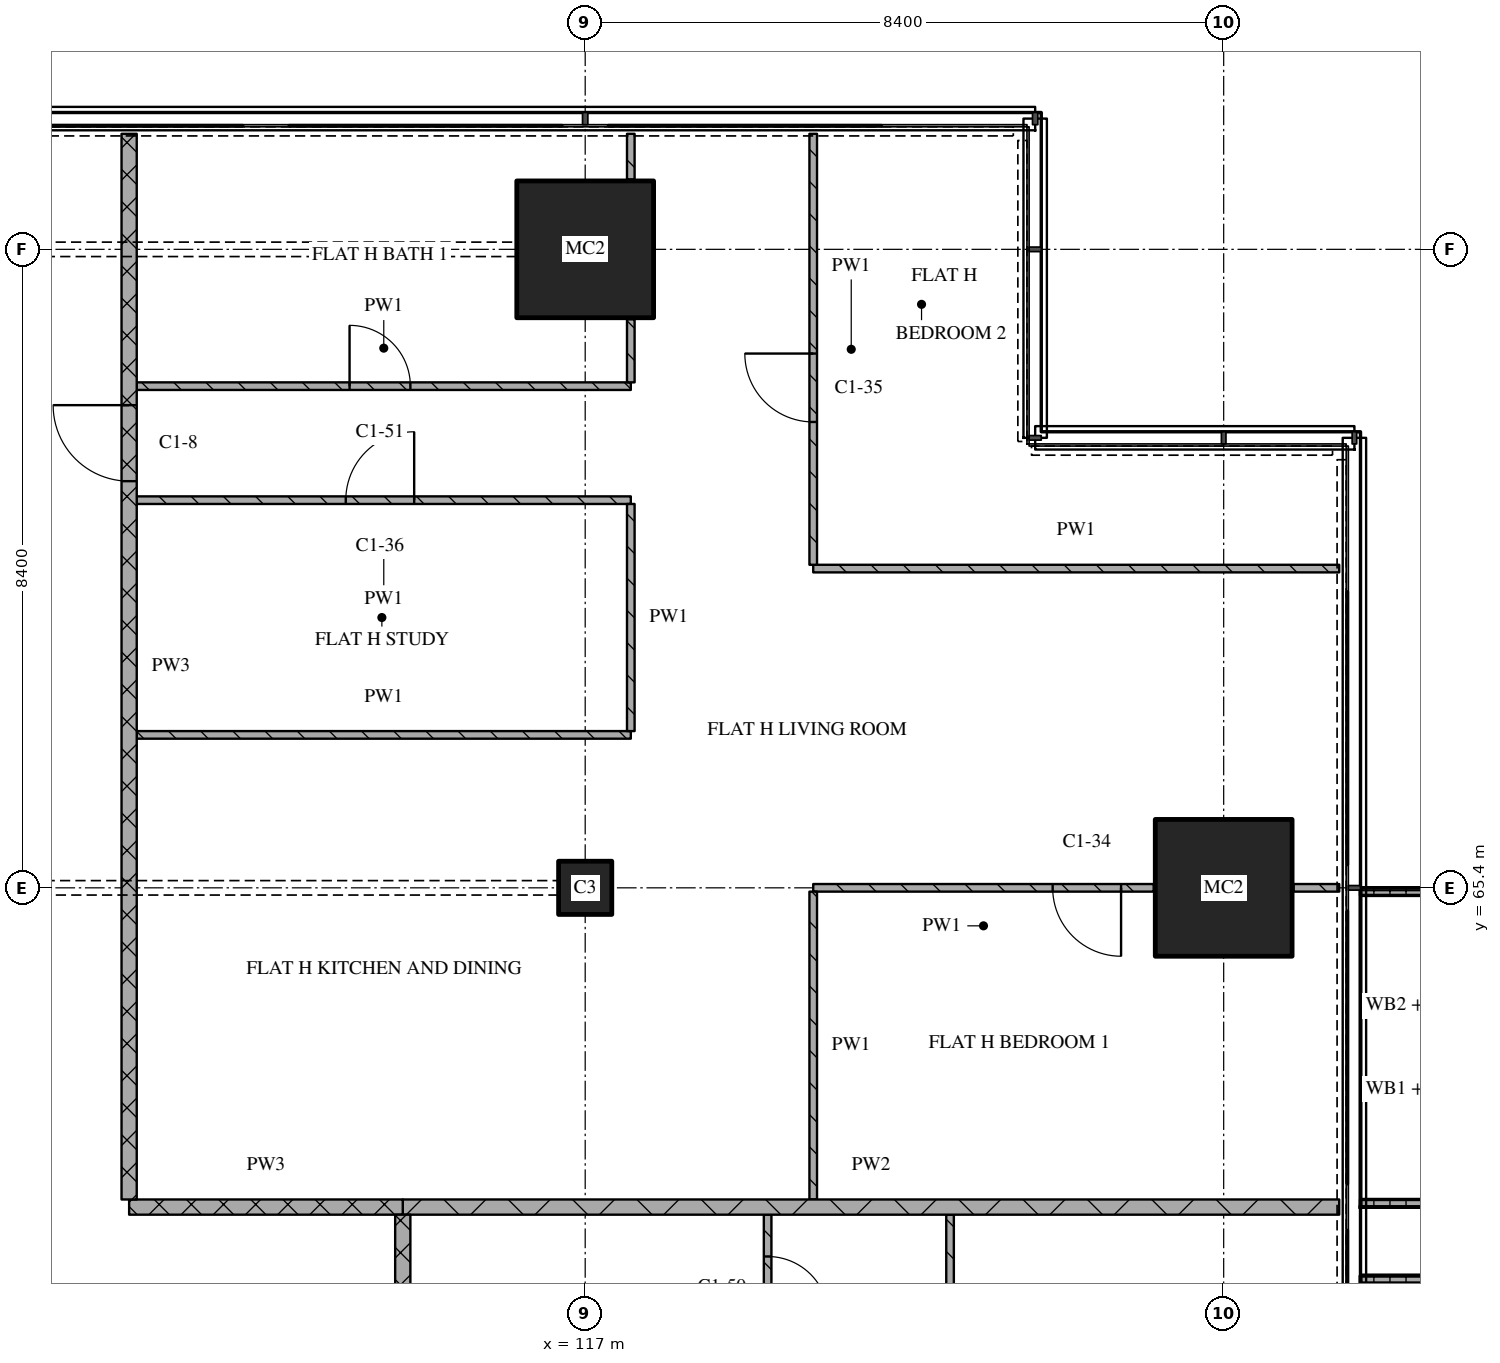
"""IFC4 building model, lengths in metres.
Left out: names, types, materials, properties, quantities, classifications, styles, units other than length and angle.
Written with IfcOpenShell. Run it as: python <this file> out.ifc"""

import sys

from ifc_helpers import new_model, si_unit, direction, frame, frame_2d, origin, origin_2d, place, context, subcontext, project, spatial, polyline, rectangle, outline, extrude, element, fill, save


model = new_model("IFC4")
c1 = context("Model", 3, precision=1e-05, world=origin(), true_north=direction((0.0, 1.0)))
c2 = subcontext(c1, "Body", "Model", "MODEL_VIEW")
j1 = project(units=[si_unit("LENGTHUNIT", "METRE"), si_unit("PLANEANGLEUNIT", "RADIAN")], contexts=[c1])
p1 = place(None, origin())
s1 = spatial("IfcSite", under=j1, at=p1, CompositionType="ELEMENT")
p2 = place(p1, origin())
s2 = spatial("IfcBuilding", under=s1, at=p2, CompositionType="ELEMENT")
p3 = place(p2, frame((0.0, 0.0, 147.45)))
s3 = spatial("IfcBuildingStorey", under=s2, at=p3, CompositionType="ELEMENT", Elevation=147.45)
p4 = place(p3, frame((117.0, 65.4, 0.0), z_axis=(0.0, 0.0, 1.0), x_axis=(1.0, 0.0, 0.0)))
e1 = element("IfcColumn", 1, at=p4, inside=s3, PredefinedType="COLUMN", context=c2, shape_type="SweptSolid", body=[
    extrude(rectangle(XDim=0.7, YDim=0.7, at=origin_2d()), origin(), (0.0, 0.0, 1.0), 3.6),
])
for number, where, z_axis, x_axis in (
    (2, (117.0, 73.8, 0.0), (0.0, 0.0, 1.0), (1.0, 0.0, 0.0)),
    (3, (125.4, 65.4, 0.0), (0.0, 0.0, 1.0), (1.0, 0.0, 0.0)),
):
    element("IfcColumn", number, at=place(p3, frame(where, z_axis=z_axis, x_axis=x_axis)), inside=s3, PredefinedType="COLUMN", context=c2, shape_type="SweptSolid", body=[
        extrude(rectangle(XDim=1.8, YDim=1.8, at=origin_2d()), origin(), (0.0, 0.0, 1.0), 3.6),
    ])
p5 = place(p3, origin())
e4 = element("IfcWall", 4, at=p5, inside=s3, PredefinedType="SOLIDWALL", context=c2, shape_type="SweptSolid", body=[
    extrude(outline(polyline([(127.2, 57.9), (127.2, 58.0), (128.7, 58.0), (128.7, 60.2), (127.2, 60.2), (127.2, 60.3), (128.8, 60.3), (128.8, 57.9), (127.2, 57.9)])), origin(), (0.0, 0.0, 1.0), 1.0),
])
p6 = place(p3, origin())
e5 = element("IfcWall", 5, at=p6, inside=s3, PredefinedType="SOLIDWALL", context=c2, shape_type="SweptSolid", body=[
    extrude(outline(polyline([(127.2, 61.2), (127.2, 61.3), (128.833, 61.3), (128.833, 65.3), (127.2, 65.3), (127.2, 65.4), (128.933, 65.4), (128.933, 61.2), (127.2, 61.2)])), origin(), (0.0, 0.0, 1.0), 1.0),
])
p7 = place(p3, frame((111.0, 61.2, 0.0), z_axis=(0.0, 0.0, 1.0), x_axis=(1.0, 0.0, 0.0)))
e6 = element("IfcWall", 6, at=p7, inside=s3, PredefinedType="PARTITIONING", context=c2, shape_type="SweptSolid", body=[
    extrude(rectangle(XDim=3.6, YDim=0.2, at=frame_2d((1.8, 0.0))), origin(), (0.0, 0.0, 1.0), 3.32),
])
p8 = place(p3, frame((114.6, 61.2, 0.0), z_axis=(0.0, 0.0, 1.0), x_axis=(1.0, 0.0, 0.0)))
e7 = element("IfcWall", 7, at=p8, inside=s3, PredefinedType="PARTITIONING", context=c2, shape_type="SweptSolid", body=[
    extrude(rectangle(XDim=12.32, YDim=0.2, at=frame_2d((6.16, 0.0))), origin(), (0.0, 0.0, 1.0), 3.32),
])
p9 = place(p3, frame((124.48, 65.4, 0.0), z_axis=(0.0, 0.0, 1.0), x_axis=(-1.0, 0.0, 0.0)))
e8 = element("IfcWall", 8, at=p9, inside=s3, PredefinedType="PARTITIONING", context=c2, shape_type="SweptSolid", body=[
    extrude(rectangle(XDim=4.48, YDim=0.1, at=frame_2d((2.24, 0.0))), origin(), (0.0, 0.0, 1.0), 3.32),
])
p10 = place(p9, frame((0.43, 0.0, 0.0)))
e9 = element("IfcOpeningElement", 9, at=p10, cuts=e8, PredefinedType="OPENING", context=c2, shape_type="SweptSolid", body=[
    extrude(rectangle(XDim=0.9, YDim=2.1, at=frame_2d((0.45, 1.05))), frame((0.0, 0.06, 0.0), z_axis=(0.0, -1.0, 0.0), x_axis=(1.0, 0.0, 0.0)), (0.0, 0.0, 1.0), 0.12),
])
p11 = place(p3, frame((126.32, 65.4, 0.0), z_axis=(0.0, 0.0, 1.0), x_axis=(1.0, 0.0, 0.0)))
e10 = element("IfcWall", 10, at=p11, inside=s3, PredefinedType="PARTITIONING", context=c2, shape_type="SweptSolid", body=[
    extrude(rectangle(XDim=0.6, YDim=0.1, at=frame_2d((0.3, 0.0))), origin(), (0.0, 0.0, 1.0), 3.32),
])
p12 = place(p3, frame((111.1, 67.412, 0.0), z_axis=(0.0, 0.0, 1.0), x_axis=(1.0, 0.0, 0.0)))
e11 = element("IfcWall", 11, at=p12, inside=s3, PredefinedType="PARTITIONING", context=c2, shape_type="SweptSolid", body=[
    extrude(rectangle(XDim=6.5, YDim=0.1, at=frame_2d((3.25, 0.0))), origin(), (0.0, 0.0, 1.0), 3.32),
])
p13 = place(p3, frame((120.0, 69.6, 0.0), z_axis=(0.0, 0.0, 1.0), x_axis=(1.0, 0.0, 0.0)))
e12 = element("IfcWall", 12, at=p13, inside=s3, PredefinedType="PARTITIONING", context=c2, shape_type="SweptSolid", body=[
    extrude(rectangle(XDim=6.92, YDim=0.1, at=frame_2d((3.46, 0.0))), origin(), (0.0, 0.0, 1.0), 3.32),
])
p14 = place(p3, frame((117.6, 70.5, 0.0), z_axis=(0.0, 0.0, 1.0), x_axis=(-1.0, 0.0, 0.0)))
e13 = element("IfcWall", 13, at=p14, inside=s3, PredefinedType="PARTITIONING", context=c2, shape_type="SweptSolid", body=[
    extrude(rectangle(XDim=6.5, YDim=0.1, at=frame_2d((3.25, 0.0))), origin(), (0.0, 0.0, 1.0), 3.32),
])
p15 = place(p14, frame((2.85, 0.0, 0.0)))
e14 = element("IfcOpeningElement", 14, at=p15, cuts=e13, PredefinedType="OPENING", context=c2, shape_type="SweptSolid", body=[
    extrude(rectangle(XDim=0.9, YDim=2.1, at=frame_2d((0.45, 1.05))), frame((0.0, 0.06, 0.0), z_axis=(0.0, -1.0, 0.0), x_axis=(1.0, 0.0, 0.0)), (0.0, 0.0, 1.0), 0.12),
])
p16 = place(p3, frame((111.1, 72.0, 0.0), z_axis=(0.0, 0.0, 1.0), x_axis=(1.0, 0.0, 0.0)))
e15 = element("IfcWall", 15, at=p16, inside=s3, PredefinedType="PARTITIONING", context=c2, shape_type="SweptSolid", body=[
    extrude(rectangle(XDim=6.5, YDim=0.1, at=frame_2d((3.25, 0.0))), origin(), (0.0, 0.0, 1.0), 3.32),
])
p17 = place(p16, frame((2.8, 0.0, 0.0)))
e16 = element("IfcOpeningElement", 16, at=p17, cuts=e15, PredefinedType="OPENING", context=c2, shape_type="SweptSolid", body=[
    extrude(rectangle(XDim=0.8, YDim=2.1, at=frame_2d((0.4, 1.05))), frame((0.0, 0.06, 0.0), z_axis=(0.0, -1.0, 0.0), x_axis=(1.0, 0.0, 0.0)), (0.0, 0.0, 1.0), 0.12),
])
p18 = place(p3, frame((111.0, 75.32, 0.0), z_axis=(0.0, 0.0, 1.0), x_axis=(0.0, -1.0, 0.0)))
e17 = element("IfcWall", 17, at=p18, inside=s3, PredefinedType="PARTITIONING", context=c2, shape_type="SweptSolid", body=[
    extrude(rectangle(XDim=14.02, YDim=0.2, at=frame_2d((7.01, 0.0))), origin(), (0.0, 0.0, 1.0), 3.32),
])
p19 = place(p18, frame((3.57, 0.0, 0.0)))
e18 = element("IfcOpeningElement", 18, at=p19, cuts=e17, PredefinedType="OPENING", context=c2, shape_type="SweptSolid", body=[
    extrude(rectangle(XDim=1.0, YDim=2.1, at=frame_2d((0.5, 1.05))), frame((0.0, 0.11, 0.0), z_axis=(0.0, -1.0, 0.0), x_axis=(1.0, 0.0, 0.0)), (0.0, 0.0, 1.0), 0.22),
])
p20 = place(p3, frame((114.6, 61.1, 0.0), z_axis=(0.0, 0.0, 1.0), x_axis=(0.0, -1.0, 0.0)))
e19 = element("IfcWall", 19, at=p20, inside=s3, PredefinedType="PARTITIONING", context=c2, shape_type="SweptSolid", body=[
    extrude(rectangle(XDim=17.8, YDim=0.2, at=frame_2d((8.9, 0.0))), origin(), (0.0, 0.0, 1.0), 3.32),
])
p21 = place(p20, frame((4.65, 0.0, 0.0)))
e20 = element("IfcOpeningElement", 20, at=p21, cuts=e19, PredefinedType="OPENING", context=c2, shape_type="SweptSolid", body=[
    extrude(rectangle(XDim=1.0, YDim=2.1, at=frame_2d((0.5, 1.05))), frame((0.0, 0.11, 0.0), z_axis=(0.0, -1.0, 0.0), x_axis=(1.0, 0.0, 0.0)), (0.0, 0.0, 1.0), 0.22),
])
p22 = place(p3, frame((117.6, 70.45, 0.0), z_axis=(0.0, 0.0, 1.0), x_axis=(0.0, -1.0, 0.0)))
e21 = element("IfcWall", 21, at=p22, inside=s3, PredefinedType="PARTITIONING", context=c2, shape_type="SweptSolid", body=[
    extrude(rectangle(XDim=2.988, YDim=0.1, at=frame_2d((1.494, 0.0))), origin(), (0.0, 0.0, 1.0), 3.32),
])
p23 = place(p3, frame((117.6, 72.88, 0.0), z_axis=(0.0, 0.0, 1.0), x_axis=(0.0, -1.0, 0.0)))
e22 = element("IfcWall", 22, at=p23, inside=s3, PredefinedType="PARTITIONING", context=c2, shape_type="SweptSolid", body=[
    extrude(rectangle(XDim=0.83, YDim=0.1, at=frame_2d((0.415, 0.0))), origin(), (0.0, 0.0, 1.0), 3.32),
])
p24 = place(p3, frame((117.6, 75.32, 0.0), z_axis=(0.0, 0.0, 1.0), x_axis=(0.0, -1.0, 0.0)))
e23 = element("IfcWall", 23, at=p24, inside=s3, PredefinedType="PARTITIONING", context=c2, shape_type="SweptSolid", body=[
    extrude(rectangle(XDim=0.6, YDim=0.1, at=frame_2d((0.3, 0.0))), origin(), (0.0, 0.0, 1.0), 3.32),
])
p25 = place(p3, frame((119.4, 56.75, 0.0), z_axis=(0.0, 0.0, 1.0), x_axis=(0.0, 1.0, 0.0)))
e24 = element("IfcWall", 24, at=p25, inside=s3, PredefinedType="PARTITIONING", context=c2, shape_type="SweptSolid", body=[
    extrude(rectangle(XDim=4.35, YDim=0.1, at=frame_2d((2.175, 0.0))), origin(), (0.0, 0.0, 1.0), 3.32),
])
p26 = place(p25, frame((3.0, 0.0, 0.0)))
e25 = element("IfcOpeningElement", 25, at=p26, cuts=e24, PredefinedType="OPENING", context=c2, shape_type="SweptSolid", body=[
    extrude(rectangle(XDim=0.8, YDim=2.1, at=frame_2d((0.4, 1.05))), frame((0.0, 0.06, 0.0), z_axis=(0.0, -1.0, 0.0), x_axis=(1.0, 0.0, 0.0)), (0.0, 0.0, 1.0), 0.12),
])
p27 = place(p3, frame((120.0, 65.35, 0.0), z_axis=(0.0, 0.0, 1.0), x_axis=(0.0, -1.0, 0.0)))
e26 = element("IfcWall", 26, at=p27, inside=s3, PredefinedType="PARTITIONING", context=c2, shape_type="SweptSolid", body=[
    extrude(rectangle(XDim=4.05, YDim=0.1, at=frame_2d((2.025, 0.0))), origin(), (0.0, 0.0, 1.0), 3.32),
])
p28 = place(p3, frame((120.0, 75.32, 0.0), z_axis=(0.0, 0.0, 1.0), x_axis=(0.0, -1.0, 0.0)))
e27 = element("IfcWall", 27, at=p28, inside=s3, PredefinedType="PARTITIONING", context=c2, shape_type="SweptSolid", body=[
    extrude(rectangle(XDim=5.67, YDim=0.1, at=frame_2d((2.835, 0.0))), origin(), (0.0, 0.0, 1.0), 3.32),
])
p29 = place(p28, frame((2.891, 0.0, 0.0)))
e28 = element("IfcOpeningElement", 28, at=p29, cuts=e27, PredefinedType="OPENING", context=c2, shape_type="SweptSolid", body=[
    extrude(rectangle(XDim=0.9, YDim=2.1, at=frame_2d((0.45, 1.05))), frame((0.0, 0.06, 0.0), z_axis=(0.0, -1.0, 0.0), x_axis=(1.0, 0.0, 0.0)), (0.0, 0.0, 1.0), 0.12),
])
p30 = place(p3, frame((121.8, 61.1, 0.0), z_axis=(0.0, 0.0, 1.0), x_axis=(0.0, -1.0, 0.0)))
e29 = element("IfcWall", 29, at=p30, inside=s3, PredefinedType="PARTITIONING", context=c2, shape_type="SweptSolid", body=[
    extrude(rectangle(XDim=8.25, YDim=0.1, at=frame_2d((4.125, 0.0))), origin(), (0.0, 0.0, 1.0), 3.32),
])
p31 = place(p30, frame((3.65, 0.0, 0.0)))
e30 = element("IfcOpeningElement", 30, at=p31, cuts=e29, PredefinedType="OPENING", context=c2, shape_type="SweptSolid", body=[
    extrude(rectangle(XDim=0.9, YDim=2.1, at=frame_2d((0.45, 1.05))), frame((0.0, 0.06, 0.0), z_axis=(0.0, -1.0, 0.0), x_axis=(1.0, 0.0, 0.0)), (0.0, 0.0, 1.0), 0.12),
])
p32 = place(p10, origin())
e31 = element("IfcDoor", 31, at=p32, inside=s3, OperationType="SINGLE_SWING_LEFT", PredefinedType="DOOR", context=c2, shape_type="SweptSolid", body=[
    extrude(rectangle(XDim=0.9, YDim=2.1, at=frame_2d((0.45, 1.05))), frame((0.0, 0.025, 0.0), z_axis=(0.0, -1.0, 0.0), x_axis=(1.0, 0.0, 0.0)), (0.0, 0.0, 1.0), 0.05),
])
fill(e9, e31)
p33 = place(p15, origin())
e32 = element("IfcDoor", 32, at=p33, inside=s3, OperationType="SINGLE_SWING_RIGHT", PredefinedType="DOOR", context=c2, shape_type="SweptSolid", body=[
    extrude(rectangle(XDim=0.9, YDim=2.1, at=frame_2d((0.45, 1.05))), frame((0.0, 0.025, 0.0), z_axis=(0.0, -1.0, 0.0), x_axis=(1.0, 0.0, 0.0)), (0.0, 0.0, 1.0), 0.05),
])
fill(e14, e32)
p34 = place(p17, origin())
e33 = element("IfcDoor", 33, at=p34, inside=s3, OperationType="SINGLE_SWING_LEFT", PredefinedType="DOOR", context=c2, shape_type="SweptSolid", body=[
    extrude(rectangle(XDim=0.8, YDim=2.1, at=frame_2d((0.4, 1.05))), frame((0.0, 0.025, 0.0), z_axis=(0.0, -1.0, 0.0), x_axis=(1.0, 0.0, 0.0)), (0.0, 0.0, 1.0), 0.05),
])
fill(e16, e33)
p35 = place(p19, origin())
e34 = element("IfcDoor", 34, at=p35, inside=s3, OperationType="SINGLE_SWING_RIGHT", PredefinedType="DOOR", context=c2, shape_type="SweptSolid", body=[
    extrude(rectangle(XDim=1.0, YDim=2.1, at=frame_2d((0.5, 1.05))), frame((0.0, 0.025, 0.0), z_axis=(0.0, -1.0, 0.0), x_axis=(1.0, 0.0, 0.0)), (0.0, 0.0, 1.0), 0.05),
])
fill(e18, e34)
p36 = place(p26, origin())
e35 = element("IfcDoor", 35, at=p36, inside=s3, OperationType="SINGLE_SWING_RIGHT", PredefinedType="DOOR", context=c2, shape_type="SweptSolid", body=[
    extrude(rectangle(XDim=0.8, YDim=2.1, at=frame_2d((0.4, 1.05))), frame((0.0, 0.025, 0.0), z_axis=(0.0, -1.0, 0.0), x_axis=(1.0, 0.0, 0.0)), (0.0, 0.0, 1.0), 0.05),
])
fill(e25, e35)
p37 = place(p29, origin())
e36 = element("IfcDoor", 36, at=p37, inside=s3, OperationType="SINGLE_SWING_RIGHT", PredefinedType="DOOR", context=c2, shape_type="SweptSolid", body=[
    extrude(rectangle(XDim=0.9, YDim=2.1, at=frame_2d((0.45, 1.05))), frame((0.0, 0.025, 0.0), z_axis=(0.0, -1.0, 0.0), x_axis=(1.0, 0.0, 0.0)), (0.0, 0.0, 1.0), 0.05),
])
fill(e28, e36)
save(model, sys.argv[1])
